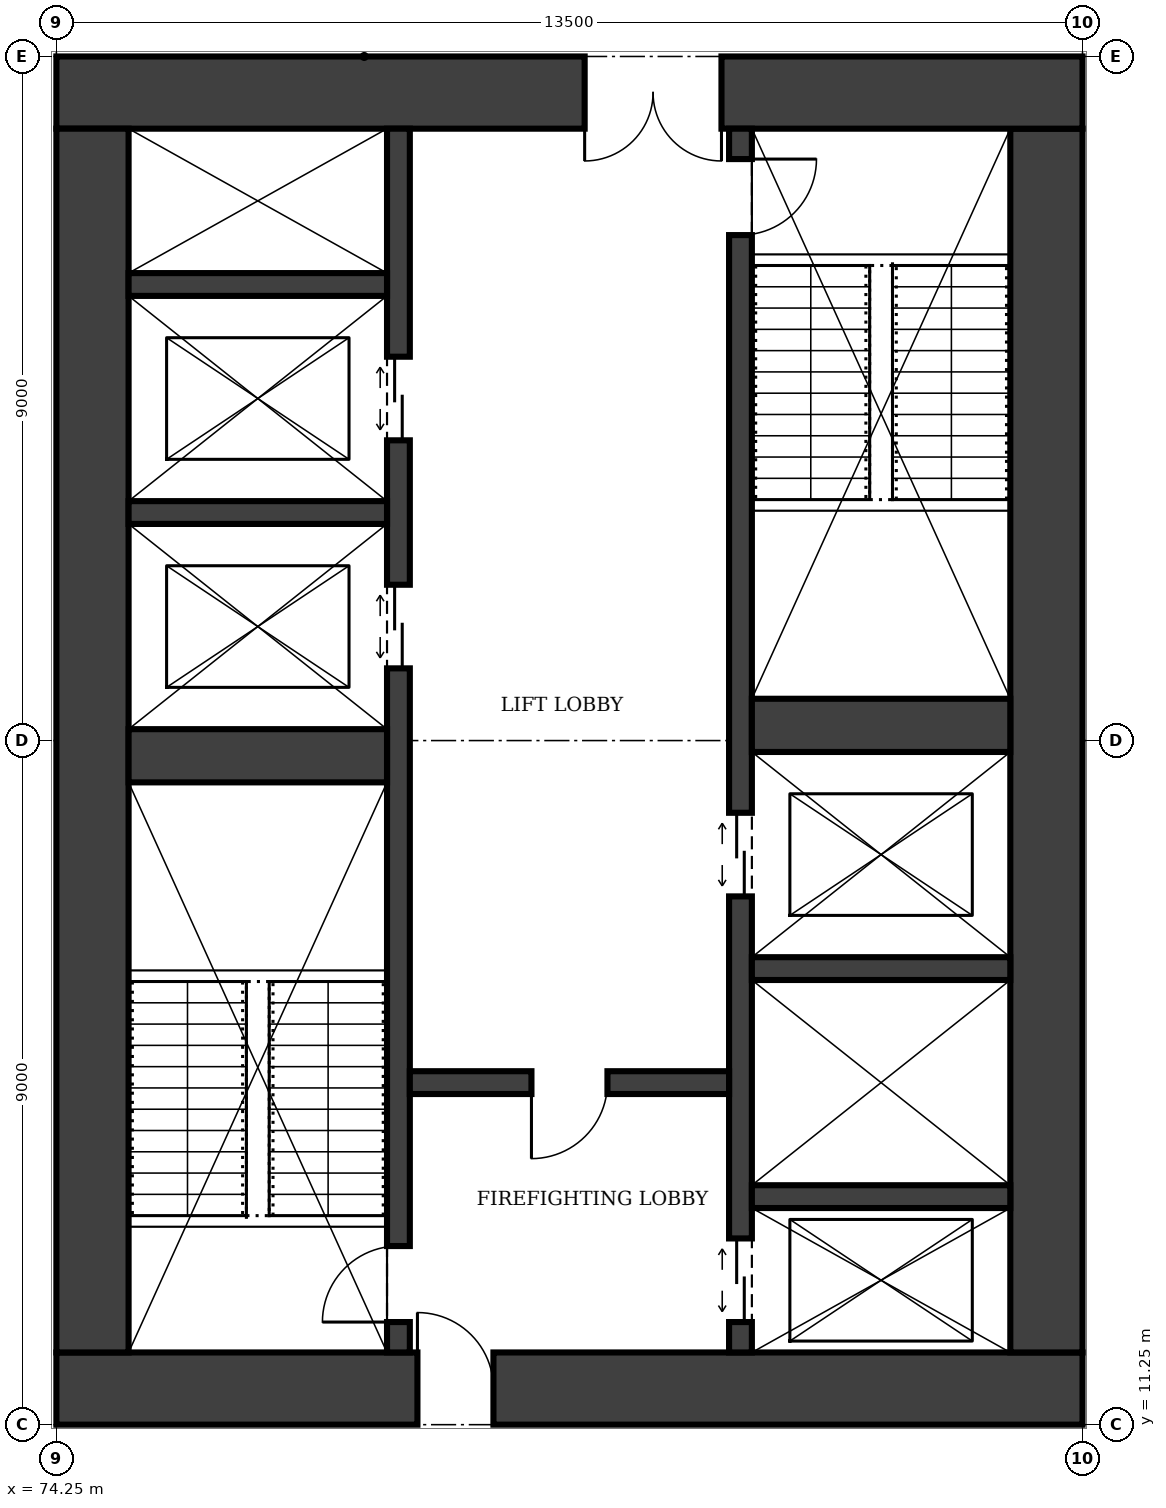
"""IFC4 building model, lengths in metres.
Left out: names, types, materials, properties, quantities, classifications, styles, units other than length and angle.
Written with IfcOpenShell. Run it as: python <this file> out.ifc"""

import sys

from ifc_helpers import new_model, si_unit, direction, frame, frame_2d, origin, place, context, subcontext, project, spatial, rectangle, extrude, element, fill, save


model = new_model("IFC4")
c1 = context("Model", 3, precision=1e-05, world=origin(), true_north=direction((0.0, 1.0)))
c2 = subcontext(c1, "Body", "Model", "MODEL_VIEW")
j1 = project(units=[si_unit("LENGTHUNIT", "METRE"), si_unit("PLANEANGLEUNIT", "RADIAN")], contexts=[c1])
p1 = place(None, origin())
s1 = spatial("IfcSite", under=j1, at=p1, CompositionType="ELEMENT")
p2 = place(p1, origin())
s2 = spatial("IfcBuilding", under=s1, at=p2, CompositionType="ELEMENT")
p3 = place(p2, frame((0.0, 0.0, 65.0)))
s3 = spatial("IfcBuildingStorey", under=s2, at=p3, CompositionType="ELEMENT", Elevation=65.0)
p4 = place(p3, frame((74.25, 11.725, 0.0), z_axis=(0.0, 0.0, 1.0), x_axis=(1.0, 0.0, 0.0)))
e1 = element("IfcWall", 1, at=p4, inside=s3, PredefinedType="SHEAR", context=c2, shape_type="SweptSolid", body=[
    extrude(rectangle(XDim=13.5, YDim=0.95, at=frame_2d((6.75, 0.0))), origin(), (0.0, 0.0, 1.0), 4.0),
])
p5 = place(p4, frame((4.75, 0.0, 0.0)))
e2 = element("IfcOpeningElement", 2, at=p5, cuts=e1, PredefinedType="OPENING", context=c2, shape_type="SweptSolid", body=[
    extrude(rectangle(XDim=1.0, YDim=2.1, at=frame_2d((0.5, 1.05))), frame((0.0, 0.485, 0.0), z_axis=(0.0, -1.0, 0.0), x_axis=(1.0, 0.0, 0.0)), (0.0, 0.0, 1.0), 0.97),
])
p6 = place(p3, frame((87.275, 12.2, 0.0), z_axis=(0.0, 0.0, 1.0), x_axis=(0.0, 1.0, 0.0)))
e3 = element("IfcWall", 3, at=p6, inside=s3, PredefinedType="SHEAR", context=c2, shape_type="SweptSolid", body=[
    extrude(rectangle(XDim=16.1, YDim=0.95, at=frame_2d((8.05, 0.0))), origin(), (0.0, 0.0, 1.0), 4.0),
])
p7 = place(p3, frame((87.75, 28.775, 0.0), z_axis=(0.0, 0.0, 1.0), x_axis=(-1.0, 0.0, 0.0)))
e4 = element("IfcWall", 4, at=p7, inside=s3, PredefinedType="SHEAR", context=c2, shape_type="SweptSolid", body=[
    extrude(rectangle(XDim=13.5, YDim=0.95, at=frame_2d((6.75, 0.0))), origin(), (0.0, 0.0, 1.0), 4.0),
])
p8 = place(p7, frame((4.75, 0.0, 0.0)))
e5 = element("IfcOpeningElement", 5, at=p8, cuts=e4, PredefinedType="OPENING", context=c2, shape_type="SweptSolid", body=[
    extrude(rectangle(XDim=1.8, YDim=2.1, at=frame_2d((0.9, 1.05))), frame((0.0, 0.485, 0.0), z_axis=(0.0, -1.0, 0.0), x_axis=(1.0, 0.0, 0.0)), (0.0, 0.0, 1.0), 0.97),
])
p9 = place(p3, frame((74.725, 28.3, 0.0), z_axis=(0.0, 0.0, 1.0), x_axis=(0.0, -1.0, 0.0)))
e6 = element("IfcWall", 6, at=p9, inside=s3, PredefinedType="SHEAR", context=c2, shape_type="SweptSolid", body=[
    extrude(rectangle(XDim=16.1, YDim=0.95, at=frame_2d((8.05, 0.0))), origin(), (0.0, 0.0, 1.0), 4.0),
])
p10 = place(p3, frame((78.75, 12.2, 0.0), z_axis=(0.0, 0.0, 1.0), x_axis=(0.0, 1.0, 0.0)))
e7 = element("IfcWall", 7, at=p10, inside=s3, PredefinedType="SHEAR", context=c2, shape_type="SweptSolid", body=[
    extrude(rectangle(XDim=16.1, YDim=0.3, at=frame_2d((8.05, 0.0))), origin(), (0.0, 0.0, 1.0), 4.0),
])
p11 = place(p10, frame((0.4, 0.0, 0.0)))
e8 = element("IfcOpeningElement", 8, at=p11, cuts=e7, PredefinedType="OPENING", context=c2, shape_type="SweptSolid", body=[
    extrude(rectangle(XDim=1.0, YDim=2.1, at=frame_2d((0.5, 1.05))), frame((0.0, 0.16, 0.0), z_axis=(0.0, -1.0, 0.0), x_axis=(1.0, 0.0, 0.0)), (0.0, 0.0, 1.0), 0.32),
])
p12 = place(p10, frame((9.0, 0.0, 0.0)))
e9 = element("IfcOpeningElement", 9, at=p12, cuts=e7, PredefinedType="OPENING", context=c2, shape_type="SweptSolid", body=[
    extrude(rectangle(XDim=1.1, YDim=2.1, at=frame_2d((0.55, 1.05))), frame((0.0, 0.16, 0.0), z_axis=(0.0, -1.0, 0.0), x_axis=(1.0, 0.0, 0.0)), (0.0, 0.0, 1.0), 0.32),
])
p13 = place(p10, frame((12.0, 0.0, 0.0)))
e10 = element("IfcOpeningElement", 10, at=p13, cuts=e7, PredefinedType="OPENING", context=c2, shape_type="SweptSolid", body=[
    extrude(rectangle(XDim=1.1, YDim=2.1, at=frame_2d((0.55, 1.05))), frame((0.0, 0.16, 0.0), z_axis=(0.0, -1.0, 0.0), x_axis=(1.0, 0.0, 0.0)), (0.0, 0.0, 1.0), 0.32),
])
p14 = place(p3, frame((83.25, 12.2, 0.0), z_axis=(0.0, 0.0, 1.0), x_axis=(0.0, 1.0, 0.0)))
e11 = element("IfcWall", 11, at=p14, inside=s3, PredefinedType="SHEAR", context=c2, shape_type="SweptSolid", body=[
    extrude(rectangle(XDim=16.1, YDim=0.3, at=frame_2d((8.05, 0.0))), origin(), (0.0, 0.0, 1.0), 4.0),
])
p15 = place(p14, frame((14.7, 0.0, 0.0)))
e12 = element("IfcOpeningElement", 12, at=p15, cuts=e11, PredefinedType="OPENING", context=c2, shape_type="SweptSolid", body=[
    extrude(rectangle(XDim=1.0, YDim=2.1, at=frame_2d((0.5, 1.05))), frame((0.0, 0.16, 0.0), z_axis=(0.0, -1.0, 0.0), x_axis=(1.0, 0.0, 0.0)), (0.0, 0.0, 1.0), 0.32),
])
p16 = place(p14, frame((0.4, 0.0, 0.0)))
e13 = element("IfcOpeningElement", 13, at=p16, cuts=e11, PredefinedType="OPENING", context=c2, shape_type="SweptSolid", body=[
    extrude(rectangle(XDim=1.1, YDim=2.1, at=frame_2d((0.55, 1.05))), frame((0.0, 0.16, 0.0), z_axis=(0.0, -1.0, 0.0), x_axis=(1.0, 0.0, 0.0)), (0.0, 0.0, 1.0), 0.32),
])
p17 = place(p14, frame((6.0, 0.0, 0.0)))
e14 = element("IfcOpeningElement", 14, at=p17, cuts=e11, PredefinedType="OPENING", context=c2, shape_type="SweptSolid", body=[
    extrude(rectangle(XDim=1.1, YDim=2.1, at=frame_2d((0.55, 1.05))), frame((0.0, 0.16, 0.0), z_axis=(0.0, -1.0, 0.0), x_axis=(1.0, 0.0, 0.0)), (0.0, 0.0, 1.0), 0.32),
])
p18 = place(p3, frame((75.2, 20.05, 0.0), z_axis=(0.0, 0.0, 1.0), x_axis=(1.0, 0.0, 0.0)))
e15 = element("IfcWall", 15, at=p18, inside=s3, PredefinedType="SHEAR", context=c2, shape_type="SweptSolid", body=[
    extrude(rectangle(XDim=3.4, YDim=0.7, at=frame_2d((1.7, 0.0))), origin(), (0.0, 0.0, 1.0), 4.0),
])
p19 = place(p3, frame((78.9, 15.75, 0.0), z_axis=(0.0, 0.0, 1.0), x_axis=(1.0, 0.0, 0.0)))
e16 = element("IfcWall", 16, at=p19, inside=s3, PredefinedType="SHEAR", context=c2, shape_type="SweptSolid", body=[
    extrude(rectangle(XDim=4.2, YDim=0.3, at=frame_2d((2.1, 0.0))), origin(), (0.0, 0.0, 1.0), 4.0),
])
p20 = place(p19, frame((1.6, 0.0, 0.0)))
e17 = element("IfcOpeningElement", 17, at=p20, cuts=e16, PredefinedType="OPENING", context=c2, shape_type="SweptSolid", body=[
    extrude(rectangle(XDim=1.0, YDim=2.1, at=frame_2d((0.5, 1.05))), frame((0.0, 0.16, 0.0), z_axis=(0.0, -1.0, 0.0), x_axis=(1.0, 0.0, 0.0)), (0.0, 0.0, 1.0), 0.32),
])
for number, where, z_axis, x_axis in (
    (18, (83.4, 14.25, 0.0), (0.0, 0.0, 1.0), (1.0, 0.0, 0.0)),
    (19, (83.4, 17.25, 0.0), (0.0, 0.0, 1.0), (1.0, 0.0, 0.0)),
):
    element("IfcWall", number, at=place(p3, frame(where, z_axis=z_axis, x_axis=x_axis)), inside=s3, PredefinedType="SHEAR", context=c2, shape_type="SweptSolid", body=[
        extrude(rectangle(XDim=3.4, YDim=0.3, at=frame_2d((1.7, 0.0))), origin(), (0.0, 0.0, 1.0), 4.0),
    ])
p21 = place(p3, frame((83.4, 20.45, 0.0), z_axis=(0.0, 0.0, 1.0), x_axis=(1.0, 0.0, 0.0)))
e20 = element("IfcWall", 20, at=p21, inside=s3, PredefinedType="SHEAR", context=c2, shape_type="SweptSolid", body=[
    extrude(rectangle(XDim=3.4, YDim=0.7, at=frame_2d((1.7, 0.0))), origin(), (0.0, 0.0, 1.0), 4.0),
])
for number, where, z_axis, x_axis in (
    (21, (75.2, 23.25, 0.0), (0.0, 0.0, 1.0), (1.0, 0.0, 0.0)),
    (22, (75.2, 26.25, 0.0), (0.0, 0.0, 1.0), (1.0, 0.0, 0.0)),
):
    element("IfcWall", number, at=place(p3, frame(where, z_axis=z_axis, x_axis=x_axis)), inside=s3, PredefinedType="SHEAR", context=c2, shape_type="SweptSolid", body=[
        extrude(rectangle(XDim=3.4, YDim=0.3, at=frame_2d((1.7, 0.0))), origin(), (0.0, 0.0, 1.0), 4.0),
    ])
p22 = place(p5, origin())
e23 = element("IfcDoor", 23, at=p22, inside=s3, OperationType="SINGLE_SWING_LEFT", PredefinedType="DOOR", context=c2, shape_type="SweptSolid", body=[
    extrude(rectangle(XDim=1.0, YDim=2.1, at=frame_2d((0.5, 1.05))), frame((0.0, 0.025, 0.0), z_axis=(0.0, -1.0, 0.0), x_axis=(1.0, 0.0, 0.0)), (0.0, 0.0, 1.0), 0.05),
])
fill(e2, e23)
p23 = place(p8, origin())
e24 = element("IfcDoor", 24, at=p23, inside=s3, OperationType="DOUBLE_DOOR_SINGLE_SWING", PredefinedType="DOOR", context=c2, shape_type="SweptSolid", body=[
    extrude(rectangle(XDim=1.8, YDim=2.1, at=frame_2d((0.9, 1.05))), frame((0.0, 0.025, 0.0), z_axis=(0.0, -1.0, 0.0), x_axis=(1.0, 0.0, 0.0)), (0.0, 0.0, 1.0), 0.05),
])
fill(e5, e24)
p24 = place(p20, frame((1.0, 0.0, 0.0), z_axis=(0.0, 0.0, 1.0), x_axis=(-1.0, 0.0, 0.0)))
e25 = element("IfcDoor", 25, at=p24, inside=s3, OperationType="SINGLE_SWING_RIGHT", PredefinedType="DOOR", context=c2, shape_type="SweptSolid", body=[
    extrude(rectangle(XDim=1.0, YDim=2.1, at=frame_2d((0.5, 1.05))), frame((0.0, 0.025, 0.0), z_axis=(0.0, -1.0, 0.0), x_axis=(1.0, 0.0, 0.0)), (0.0, 0.0, 1.0), 0.05),
])
fill(e17, e25)
p25 = place(p11, origin())
e26 = element("IfcDoor", 26, at=p25, inside=s3, OperationType="SINGLE_SWING_LEFT", PredefinedType="DOOR", context=c2, shape_type="SweptSolid", body=[
    extrude(rectangle(XDim=1.0, YDim=2.1, at=frame_2d((0.5, 1.05))), frame((0.0, 0.025, 0.0), z_axis=(0.0, -1.0, 0.0), x_axis=(1.0, 0.0, 0.0)), (0.0, 0.0, 1.0), 0.05),
])
fill(e8, e26)
p26 = place(p15, frame((1.0, 0.0, 0.0), z_axis=(0.0, 0.0, 1.0), x_axis=(-1.0, 0.0, 0.0)))
e27 = element("IfcDoor", 27, at=p26, inside=s3, OperationType="SINGLE_SWING_LEFT", PredefinedType="DOOR", context=c2, shape_type="SweptSolid", body=[
    extrude(rectangle(XDim=1.0, YDim=2.1, at=frame_2d((0.5, 1.05))), frame((0.0, 0.025, 0.0), z_axis=(0.0, -1.0, 0.0), x_axis=(1.0, 0.0, 0.0)), (0.0, 0.0, 1.0), 0.05),
])
fill(e12, e27)
p27 = place(p16, origin())
e28 = element("IfcDoor", 28, at=p27, inside=s3, OperationType="DOUBLE_DOOR_SLIDING", PredefinedType="DOOR", context=c2, shape_type="SweptSolid", body=[
    extrude(rectangle(XDim=1.1, YDim=2.1, at=frame_2d((0.55, 1.05))), frame((0.0, 0.025, 0.0), z_axis=(0.0, -1.0, 0.0), x_axis=(1.0, 0.0, 0.0)), (0.0, 0.0, 1.0), 0.05),
])
fill(e13, e28)
p28 = place(p12, origin())
e29 = element("IfcDoor", 29, at=p28, inside=s3, OperationType="DOUBLE_DOOR_SLIDING", PredefinedType="DOOR", context=c2, shape_type="SweptSolid", body=[
    extrude(rectangle(XDim=1.1, YDim=2.1, at=frame_2d((0.55, 1.05))), frame((0.0, 0.025, 0.0), z_axis=(0.0, -1.0, 0.0), x_axis=(1.0, 0.0, 0.0)), (0.0, 0.0, 1.0), 0.05),
])
fill(e9, e29)
p29 = place(p13, origin())
e30 = element("IfcDoor", 30, at=p29, inside=s3, OperationType="DOUBLE_DOOR_SLIDING", PredefinedType="DOOR", context=c2, shape_type="SweptSolid", body=[
    extrude(rectangle(XDim=1.1, YDim=2.1, at=frame_2d((0.55, 1.05))), frame((0.0, 0.025, 0.0), z_axis=(0.0, -1.0, 0.0), x_axis=(1.0, 0.0, 0.0)), (0.0, 0.0, 1.0), 0.05),
])
fill(e10, e30)
p30 = place(p17, origin())
e31 = element("IfcDoor", 31, at=p30, inside=s3, OperationType="DOUBLE_DOOR_SLIDING", PredefinedType="DOOR", context=c2, shape_type="SweptSolid", body=[
    extrude(rectangle(XDim=1.1, YDim=2.1, at=frame_2d((0.55, 1.05))), frame((0.0, 0.025, 0.0), z_axis=(0.0, -1.0, 0.0), x_axis=(1.0, 0.0, 0.0)), (0.0, 0.0, 1.0), 0.05),
])
fill(e14, e31)
save(model, sys.argv[1])
